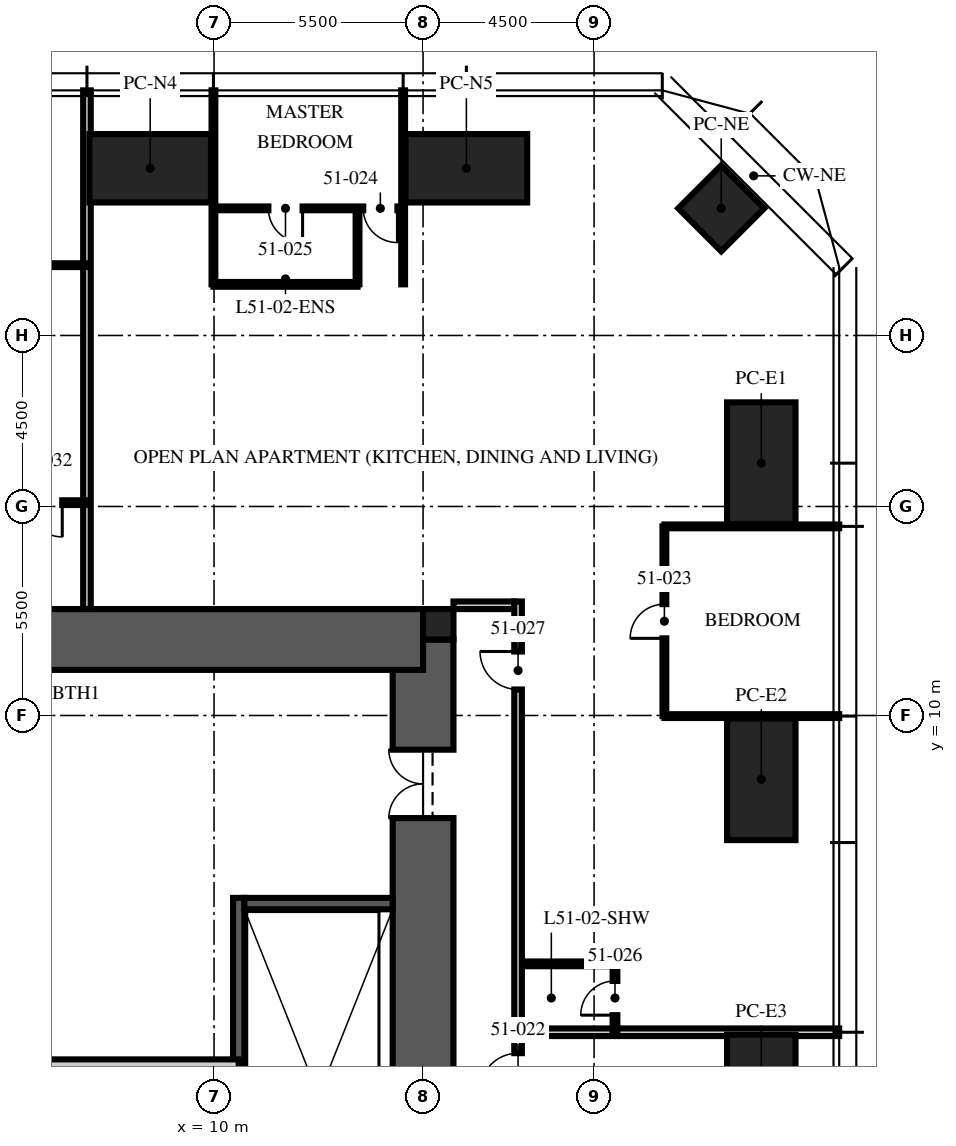
"""IFC4 building model, lengths in metres.
Left out: names, types, materials, properties, quantities, classifications, styles, units other than length and angle.
Written with IfcOpenShell. Run it as: python <this file> out.ifc"""

import sys

from ifc_helpers import new_model, si_unit, direction, frame, frame_2d, origin, origin_2d, place, context, subcontext, project, spatial, rectangle, hollow_rectangle, extrude, element, fill, save


model = new_model("IFC4")
c1 = context("Model", 3, precision=1e-05, world=origin(), true_north=direction((0.0, 1.0)))
c2 = subcontext(c1, "Body", "Model", "MODEL_VIEW")
j1 = project(units=[si_unit("LENGTHUNIT", "METRE"), si_unit("PLANEANGLEUNIT", "RADIAN")], contexts=[c1])
p1 = place(None, origin())
s1 = spatial("IfcSite", under=j1, at=p1, CompositionType="ELEMENT")
p2 = place(p1, origin())
s2 = spatial("IfcBuilding", under=s1, at=p2, CompositionType="ELEMENT")
p3 = place(p2, frame((0.0, 0.0, 207.0)))
s3 = spatial("IfcBuildingStorey", under=s2, at=p3, CompositionType="ELEMENT", Elevation=207.0)
p4 = place(p3, frame((15.5, -12.0, -0.25), z_axis=(0.0, 0.0, 1.0), x_axis=(0.0, 1.0, 0.0)))
e1 = element("IfcWall", 1, at=p4, inside=s3, PredefinedType="SHEAR", context=c2, shape_type="SweptSolid", body=[
    extrude(rectangle(XDim=24.0, YDim=1.6, at=frame_2d((12.0, 0.0))), origin(), (0.0, 0.0, 1.0), 3.75),
])
p5 = place(p4, frame((3.2, 0.0, 0.25)))
e2 = element("IfcOpeningElement", 2, at=p5, cuts=e1, PredefinedType="OPENING", context=c2, shape_type="SweptSolid", body=[
    extrude(rectangle(XDim=1.2, YDim=2.1, at=frame_2d((0.6, 1.05))), frame((0.0, 0.81, 0.0), z_axis=(0.0, -1.0, 0.0), x_axis=(1.0, 0.0, 0.0)), (0.0, 0.0, 1.0), 1.62),
])
p6 = place(p4, frame((19.3, 0.0, 0.25)))
e3 = element("IfcOpeningElement", 3, at=p6, cuts=e1, PredefinedType="OPENING", context=c2, shape_type="SweptSolid", body=[
    extrude(rectangle(XDim=1.8, YDim=2.1, at=frame_2d((0.9, 1.05))), frame((0.0, 0.81, 0.0), z_axis=(0.0, -1.0, 0.0), x_axis=(1.0, 0.0, 0.0)), (0.0, 0.0, 1.0), 1.62),
])
p7 = place(p3, frame((-15.5, 12.0, -0.25), z_axis=(0.0, 0.0, 1.0), x_axis=(1.0, 0.0, 0.0)))
e4 = element("IfcWall", 4, at=p7, inside=s3, PredefinedType="SHEAR", context=c2, shape_type="SweptSolid", body=[
    extrude(rectangle(XDim=31.0, YDim=1.6, at=frame_2d((15.5, 0.0))), origin(), (0.0, 0.0, 1.0), 3.75),
])
p8 = place(p3, frame((15.9, 12.4, -0.25), z_axis=(0.0, 0.0, 1.0), x_axis=(1.0, 0.0, 0.0)))
e5 = element("IfcColumn", 5, at=p8, inside=s3, PredefinedType="COLUMN", context=c2, shape_type="SweptSolid", body=[
    extrude(rectangle(XDim=0.8, YDim=0.8, at=origin_2d()), origin(), (0.0, 0.0, 1.0), 3.75),
])
for number, where, z_axis, x_axis in (
    (6, (8.32, 24.4, 0.0), (0.0, 0.0, 1.0), (1.0, 0.0, 0.0)),
    (7, (16.64, 24.4, 0.0), (0.0, 0.0, 1.0), (1.0, 0.0, 0.0)),
    (8, (24.4, 16.64, 0.0), (0.0, 0.0, 1.0), (0.0, 1.0, 0.0)),
    (9, (24.4, 8.32, 0.0), (0.0, 0.0, 1.0), (0.0, 1.0, 0.0)),
    (10, (24.4, 0.0, 0.0), (0.0, 0.0, 1.0), (0.0, 1.0, 0.0)),
):
    element("IfcColumn", number, at=place(p3, frame(where, z_axis=z_axis, x_axis=x_axis)), inside=s3, PredefinedType="COLUMN", context=c2, shape_type="SweptSolid", body=[
        extrude(hollow_rectangle(XDim=3.2, YDim=1.8, WallThickness=0.2, at=origin_2d()), origin(), (0.0, 0.0, 1.0), 3.75),
    ])
p9 = place(p3, frame((23.346, 23.346, 0.0), z_axis=(0.0, 0.0, 1.0), x_axis=(0.707106781187, -0.707106781187, 0.0)))
e11 = element("IfcColumn", 11, at=p9, inside=s3, PredefinedType="COLUMN", context=c2, shape_type="SweptSolid", body=[
    extrude(hollow_rectangle(XDim=1.6, YDim=1.6, WallThickness=0.1, at=origin_2d()), origin(), (0.0, 0.0, 1.0), 3.75),
])
p10 = place(p3, frame((10.65, -4.9, 0.0), z_axis=(0.0, 0.0, 1.0), x_axis=(0.0, 1.0, 0.0)))
e12 = element("IfcWall", 12, at=p10, inside=s3, PredefinedType="SOLIDWALL", context=c2, shape_type="SweptSolid", body=[
    extrude(rectangle(XDim=10.1, YDim=0.3, at=frame_2d((5.05, 0.0))), origin(), (0.0, 0.0, 1.0), 3.5),
])
p11 = place(p3, frame((14.7, 5.05, 0.0), z_axis=(0.0, 0.0, 1.0), x_axis=(-1.0, 0.0, 0.0)))
e13 = element("IfcWall", 13, at=p11, inside=s3, PredefinedType="SOLIDWALL", context=c2, shape_type="SweptSolid", body=[
    extrude(rectangle(XDim=3.9, YDim=0.3, at=frame_2d((1.95, 0.0))), origin(), (0.0, 0.0, 1.0), 3.5),
])
p12 = place(p3, frame((-10.65, 0.8, 0.0), z_axis=(0.0, 0.0, 1.0), x_axis=(1.0, 0.0, 0.0)))
e14 = element("IfcWall", 14, at=p12, inside=s3, PredefinedType="PARTITIONING", context=c2, shape_type="SweptSolid", body=[
    extrude(rectangle(XDim=21.3, YDim=0.3, at=frame_2d((10.65, 0.0))), origin(), (0.0, 0.0, 1.0), 3.5),
])
p13 = place(p12, frame((10.05, 0.0, 0.0)))
e15 = element("IfcOpeningElement", 15, at=p13, cuts=e14, PredefinedType="OPENING", context=c2, shape_type="SweptSolid", body=[
    extrude(rectangle(XDim=1.2, YDim=2.1, at=frame_2d((0.6, 1.05))), frame((0.0, 0.16, 0.0), z_axis=(0.0, -1.0, 0.0), x_axis=(1.0, 0.0, 0.0)), (0.0, 0.0, 1.0), 0.32),
])
p14 = place(p12, frame((1.74, 0.0, 0.0)))
e16 = element("IfcOpeningElement", 16, at=p14, cuts=e14, PredefinedType="OPENING", context=c2, shape_type="SweptSolid", body=[
    extrude(rectangle(XDim=0.9, YDim=2.1, at=frame_2d((0.45, 1.05))), frame((0.0, 0.16, 0.0), z_axis=(0.0, -1.0, 0.0), x_axis=(1.0, 0.0, 0.0)), (0.0, 0.0, 1.0), 0.32),
])
p15 = place(p3, frame((16.3, 12.9, 0.0), z_axis=(0.0, 0.0, 1.0), x_axis=(1.0, 0.0, 0.0)))
e17 = element("IfcWall", 17, at=p15, inside=s3, PredefinedType="PARTITIONING", context=c2, shape_type="SweptSolid", body=[
    extrude(rectangle(XDim=1.6, YDim=0.2, at=frame_2d((0.8, 0.0))), origin(), (0.0, 0.0, 1.0), 2.3),
])
p16 = place(p3, frame((18.1, 1.664, 0.0), z_axis=(0.0, 0.0, 1.0), x_axis=(1.0, 0.0, 0.0)))
e18 = element("IfcWall", 18, at=p16, inside=s3, PredefinedType="PARTITIONING", context=c2, shape_type="SweptSolid", body=[
    extrude(rectangle(XDim=8.35, YDim=0.2, at=frame_2d((4.175, 0.0))), origin(), (0.0, 0.0, 1.0), 2.91),
])
for number, where, z_axis, x_axis in (
    (19, (21.85, 9.984, 0.0), (0.0, 0.0, 1.0), (1.0, 0.0, 0.0)),
    (20, (21.85, 14.976, 0.0), (0.0, 0.0, 1.0), (1.0, 0.0, 0.0)),
):
    element("IfcWall", number, at=place(p3, frame(where, z_axis=z_axis, x_axis=x_axis)), inside=s3, PredefinedType="PARTITIONING", context=c2, shape_type="SweptSolid", body=[
        extrude(rectangle(XDim=4.6, YDim=0.1, at=frame_2d((2.3, 0.0))), origin(), (0.0, 0.0, 1.0), 2.91),
    ])
for number, where, z_axis, x_axis in (
    (21, (14.976, 21.345, 0.0), (0.0, 0.0, 1.0), (0.0, 1.0, 0.0)),
    (22, (9.984, 21.345, 0.0), (0.0, 0.0, 1.0), (0.0, 1.0, 0.0)),
):
    element("IfcWall", number, at=place(p3, frame(where, z_axis=z_axis, x_axis=x_axis)), inside=s3, PredefinedType="PARTITIONING", context=c2, shape_type="SweptSolid", body=[
        extrude(rectangle(XDim=5.105, YDim=0.1, at=frame_2d((2.552, 0.0))), origin(), (0.0, 0.0, 1.0), 2.91),
    ])
p17 = place(p3, frame((6.656, 12.8, 0.0), z_axis=(0.0, 0.0, 1.0), x_axis=(0.0, 1.0, 0.0)))
e23 = element("IfcWall", 23, at=p17, inside=s3, PredefinedType="PARTITIONING", context=c2, shape_type="SweptSolid", body=[
    extrude(rectangle(XDim=13.65, YDim=0.2, at=frame_2d((6.825, 0.0))), origin(), (0.0, 0.0, 1.0), 2.91),
])
p18 = place(p3, frame((21.85, 9.984, 0.0), z_axis=(0.0, 0.0, 1.0), x_axis=(0.0, 1.0, 0.0)))
e24 = element("IfcWall", 24, at=p18, inside=s3, PredefinedType="PARTITIONING", context=c2, shape_type="SweptSolid", body=[
    extrude(rectangle(XDim=4.992, YDim=0.1, at=frame_2d((2.496, 0.0))), origin(), (0.0, 0.0, 1.0), 2.81),
])
p19 = place(p18, frame((2.046, 0.0, 0.0)))
e25 = element("IfcOpeningElement", 25, at=p19, cuts=e24, PredefinedType="OPENING", context=c2, shape_type="SweptSolid", body=[
    extrude(rectangle(XDim=0.9, YDim=2.1, at=frame_2d((0.45, 1.05))), frame((0.0, 0.06, 0.0), z_axis=(0.0, -1.0, 0.0), x_axis=(1.0, 0.0, 0.0)), (0.0, 0.0, 1.0), 0.12),
])
p20 = place(p3, frame((14.976, 23.345, 0.0), z_axis=(0.0, 0.0, 1.0), x_axis=(-1.0, 0.0, 0.0)))
e26 = element("IfcWall", 26, at=p20, inside=s3, PredefinedType="PARTITIONING", context=c2, shape_type="SweptSolid", body=[
    extrude(rectangle(XDim=4.992, YDim=0.1, at=frame_2d((2.496, 0.0))), origin(), (0.0, 0.0, 1.0), 2.81),
])
p21 = place(p20, frame((0.15, 0.0, 0.0)))
e27 = element("IfcOpeningElement", 27, at=p21, cuts=e26, PredefinedType="OPENING", context=c2, shape_type="SweptSolid", body=[
    extrude(rectangle(XDim=0.9, YDim=2.1, at=frame_2d((0.45, 1.05))), frame((0.0, 0.06, 0.0), z_axis=(0.0, -1.0, 0.0), x_axis=(1.0, 0.0, 0.0)), (0.0, 0.0, 1.0), 0.12),
])
p22 = place(p20, frame((2.646, 0.0, 0.0)))
e28 = element("IfcOpeningElement", 28, at=p22, cuts=e26, PredefinedType="OPENING", context=c2, shape_type="SweptSolid", body=[
    extrude(rectangle(XDim=0.9, YDim=2.1, at=frame_2d((0.45, 1.05))), frame((0.0, 0.06, 0.0), z_axis=(0.0, -1.0, 0.0), x_axis=(1.0, 0.0, 0.0)), (0.0, 0.0, 1.0), 0.12),
])
p23 = place(p3, frame((13.776, 21.345, 0.0), z_axis=(0.0, 0.0, 1.0), x_axis=(0.0, 1.0, 0.0)))
e29 = element("IfcWall", 29, at=p23, inside=s3, PredefinedType="PARTITIONING", context=c2, shape_type="SweptSolid", body=[
    extrude(rectangle(XDim=2.0, YDim=0.1, at=frame_2d((1.0, 0.0))), origin(), (0.0, 0.0, 1.0), 3.5),
])
p24 = place(p3, frame((13.776, 21.345, 0.0), z_axis=(0.0, 0.0, 1.0), x_axis=(-1.0, 0.0, 0.0)))
e30 = element("IfcWall", 30, at=p24, inside=s3, PredefinedType="PARTITIONING", context=c2, shape_type="SweptSolid", body=[
    extrude(rectangle(XDim=3.792, YDim=0.125, at=frame_2d((1.896, 0.0))), origin(), (0.0, 0.0, 1.0), 2.81),
])
p25 = place(p3, frame((20.55, 1.664, 0.0), z_axis=(0.0, 0.0, 1.0), x_axis=(0.0, 1.0, 0.0)))
e31 = element("IfcWall", 31, at=p25, inside=s3, PredefinedType="PARTITIONING", context=c2, shape_type="SweptSolid", body=[
    extrude(rectangle(XDim=1.8, YDim=0.125, at=frame_2d((0.9, 0.0))), origin(), (0.0, 0.0, 1.0), 3.5),
])
p26 = place(p25, frame((0.45, 0.0, 0.0)))
e32 = element("IfcOpeningElement", 32, at=p26, cuts=e31, PredefinedType="OPENING", context=c2, shape_type="SweptSolid", body=[
    extrude(rectangle(XDim=0.9, YDim=2.1, at=frame_2d((0.45, 1.05))), frame((0.0, 0.073, 0.0), z_axis=(0.0, -1.0, 0.0), x_axis=(1.0, 0.0, 0.0)), (0.0, 0.0, 1.0), 0.145),
])
p27 = place(p3, frame((18.1, 3.464, 0.0), z_axis=(0.0, 0.0, 1.0), x_axis=(1.0, 0.0, 0.0)))
e33 = element("IfcWall", 33, at=p27, inside=s3, PredefinedType="PARTITIONING", context=c2, shape_type="SweptSolid", body=[
    extrude(rectangle(XDim=2.45, YDim=0.125, at=frame_2d((1.225, 0.0))), origin(), (0.0, 0.0, 1.0), 3.5),
])
p28 = place(p3, frame((6.656, 21.85, 0.0), z_axis=(0.0, 0.0, 1.0), x_axis=(-1.0, 0.0, 0.0)))
e34 = element("IfcWall", 34, at=p28, inside=s3, PredefinedType="PARTITIONING", context=c2, shape_type="SweptSolid", body=[
    extrude(rectangle(XDim=4.992, YDim=0.1, at=frame_2d((2.496, 0.0))), origin(), (0.0, 0.0, 1.0), 2.81),
])
p29 = place(p28, frame((2.046, 0.0, 0.0)))
e35 = element("IfcOpeningElement", 35, at=p29, cuts=e34, PredefinedType="OPENING", context=c2, shape_type="SweptSolid", body=[
    extrude(rectangle(XDim=0.9, YDim=2.1, at=frame_2d((0.45, 1.05))), frame((0.0, 0.06, 0.0), z_axis=(0.0, -1.0, 0.0), x_axis=(1.0, 0.0, 0.0)), (0.0, 0.0, 1.0), 0.12),
])
p30 = place(p3, frame((6.656, 15.6, 0.0), z_axis=(0.0, 0.0, 1.0), x_axis=(-1.0, 0.0, 0.0)))
e36 = element("IfcWall", 36, at=p30, inside=s3, PredefinedType="PARTITIONING", context=c2, shape_type="SweptSolid", body=[
    extrude(rectangle(XDim=2.2, YDim=0.125, at=frame_2d((1.1, 0.0))), origin(), (0.0, 0.0, 1.0), 3.5),
])
p31 = place(p30, frame((0.65, 0.0, 0.0)))
e37 = element("IfcOpeningElement", 37, at=p31, cuts=e36, PredefinedType="OPENING", context=c2, shape_type="SweptSolid", body=[
    extrude(rectangle(XDim=0.9, YDim=2.1, at=frame_2d((0.45, 1.05))), frame((0.0, 0.073, 0.0), z_axis=(0.0, -1.0, 0.0), x_axis=(1.0, 0.0, 0.0)), (0.0, 0.0, 1.0), 0.145),
])
p32 = place(p3, frame((18.0, -12.8, 0.0), z_axis=(0.0, 0.0, 1.0), x_axis=(0.0, 1.0, 0.0)))
e38 = element("IfcWall", 38, at=p32, inside=s3, PredefinedType="PARTITIONING", context=c2, shape_type="SweptSolid", body=[
    extrude(rectangle(XDim=25.8, YDim=0.2, at=frame_2d((12.9, 0.0))), origin(), (0.0, 0.0, 1.0), 2.6),
])
p33 = place(p32, frame((12.914, 0.0, 0.0)))
e39 = element("IfcOpeningElement", 39, at=p33, cuts=e38, PredefinedType="OPENING", context=c2, shape_type="SweptSolid", body=[
    extrude(rectangle(XDim=1.0, YDim=2.2, at=frame_2d((0.5, 1.1))), frame((0.0, 0.11, 0.0), z_axis=(0.0, -1.0, 0.0), x_axis=(1.0, 0.0, 0.0)), (0.0, 0.0, 1.0), 0.22),
])
p34 = place(p32, frame((23.484, 0.0, 0.0)))
e40 = element("IfcOpeningElement", 40, at=p34, cuts=e38, PredefinedType="OPENING", context=c2, shape_type="SweptSolid", body=[
    extrude(rectangle(XDim=1.0, YDim=2.2, at=frame_2d((0.5, 1.1))), frame((0.0, 0.11, 0.0), z_axis=(0.0, -1.0, 0.0), x_axis=(1.0, 0.0, 0.0)), (0.0, 0.0, 1.0), 0.22),
])
p35 = place(p32, frame((4.4, 0.0, 0.0)))
e41 = element("IfcOpeningElement", 41, at=p35, cuts=e38, PredefinedType="OPENING", context=c2, shape_type="SweptSolid", body=[
    extrude(rectangle(XDim=1.0, YDim=2.2, at=frame_2d((0.5, 1.1))), frame((0.0, 0.11, 0.0), z_axis=(0.0, -1.0, 0.0), x_axis=(1.0, 0.0, 0.0)), (0.0, 0.0, 1.0), 0.22),
])
p36 = place(p6, origin())
e42 = element("IfcDoor", 42, at=p36, inside=s3, OperationType="DOUBLE_DOOR_SINGLE_SWING", PredefinedType="DOOR", context=c2, shape_type="SweptSolid", body=[
    extrude(rectangle(XDim=1.8, YDim=2.1, at=frame_2d((0.9, 1.05))), frame((0.0, 0.025, 0.0), z_axis=(0.0, -1.0, 0.0), x_axis=(1.0, 0.0, 0.0)), (0.0, 0.0, 1.0), 0.05),
])
fill(e3, e42)
p37 = place(p33, origin())
e43 = element("IfcDoor", 43, at=p37, inside=s3, OperationType="SINGLE_SWING_LEFT", PredefinedType="DOOR", context=c2, shape_type="SweptSolid", body=[
    extrude(rectangle(XDim=1.0, YDim=2.2, at=frame_2d((0.5, 1.1))), frame((0.0, 0.025, 0.0), z_axis=(0.0, -1.0, 0.0), x_axis=(1.0, 0.0, 0.0)), (0.0, 0.0, 1.0), 0.05),
])
fill(e39, e43)
p38 = place(p19, origin())
e44 = element("IfcDoor", 44, at=p38, inside=s3, OperationType="SINGLE_SWING_LEFT", PredefinedType="DOOR", context=c2, shape_type="SweptSolid", body=[
    extrude(rectangle(XDim=0.9, YDim=2.1, at=frame_2d((0.45, 1.05))), frame((0.0, 0.025, 0.0), z_axis=(0.0, -1.0, 0.0), x_axis=(1.0, 0.0, 0.0)), (0.0, 0.0, 1.0), 0.05),
])
fill(e25, e44)
p39 = place(p21, origin())
e45 = element("IfcDoor", 45, at=p39, inside=s3, OperationType="SINGLE_SWING_LEFT", PredefinedType="DOOR", context=c2, shape_type="SweptSolid", body=[
    extrude(rectangle(XDim=0.9, YDim=2.1, at=frame_2d((0.45, 1.05))), frame((0.0, 0.025, 0.0), z_axis=(0.0, -1.0, 0.0), x_axis=(1.0, 0.0, 0.0)), (0.0, 0.0, 1.0), 0.05),
])
fill(e27, e45)
p40 = place(p22, origin())
e46 = element("IfcDoor", 46, at=p40, inside=s3, OperationType="SINGLE_SWING_LEFT", PredefinedType="DOOR", context=c2, shape_type="SweptSolid", body=[
    extrude(rectangle(XDim=0.9, YDim=2.1, at=frame_2d((0.45, 1.05))), frame((0.0, 0.025, 0.0), z_axis=(0.0, -1.0, 0.0), x_axis=(1.0, 0.0, 0.0)), (0.0, 0.0, 1.0), 0.05),
])
fill(e28, e46)
p41 = place(p26, origin())
e47 = element("IfcDoor", 47, at=p41, inside=s3, OperationType="SINGLE_SWING_LEFT", PredefinedType="DOOR", context=c2, shape_type="SweptSolid", body=[
    extrude(rectangle(XDim=0.9, YDim=2.1, at=frame_2d((0.45, 1.05))), frame((0.0, 0.025, 0.0), z_axis=(0.0, -1.0, 0.0), x_axis=(1.0, 0.0, 0.0)), (0.0, 0.0, 1.0), 0.05),
])
fill(e32, e47)
p42 = place(p34, origin())
e48 = element("IfcDoor", 48, at=p42, inside=s3, OperationType="SINGLE_SWING_RIGHT", PredefinedType="DOOR", context=c2, shape_type="SweptSolid", body=[
    extrude(rectangle(XDim=1.0, YDim=2.2, at=frame_2d((0.5, 1.1))), frame((0.0, 0.025, 0.0), z_axis=(0.0, -1.0, 0.0), x_axis=(1.0, 0.0, 0.0)), (0.0, 0.0, 1.0), 0.05),
])
fill(e40, e48)
p43 = place(p31, origin())
e49 = element("IfcDoor", 49, at=p43, inside=s3, OperationType="SINGLE_SWING_LEFT", PredefinedType="DOOR", context=c2, shape_type="SweptSolid", body=[
    extrude(rectangle(XDim=0.9, YDim=2.1, at=frame_2d((0.45, 1.05))), frame((0.0, 0.025, 0.0), z_axis=(0.0, -1.0, 0.0), x_axis=(1.0, 0.0, 0.0)), (0.0, 0.0, 1.0), 0.05),
])
fill(e37, e49)
save(model, sys.argv[1])
